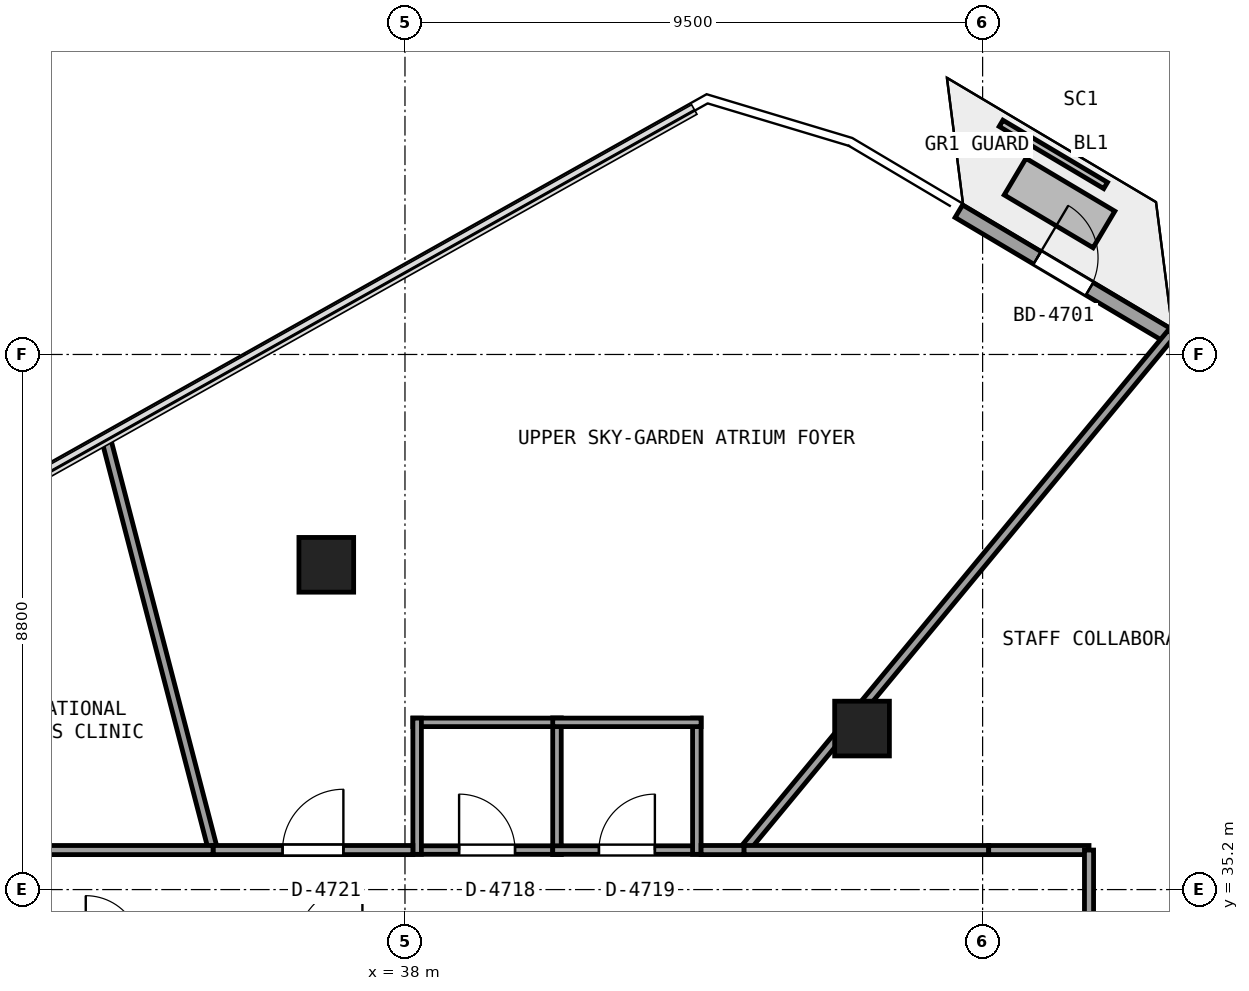
"""IFC4 building model, lengths in metres.
Left out: names, types, materials, properties, quantities, classifications, styles, units other than length and angle.
Written with IfcOpenShell. Run it as: python <this file> out.ifc"""

import sys

from ifc_helpers import new_model, si_unit, direction, frame, frame_2d, origin, origin_2d, place, context, subcontext, project, spatial, rectangle, extrude, element, fill, save


model = new_model("IFC4")
c1 = context("Model", 3, precision=1e-05, world=origin(), true_north=direction((0.0, 1.0)))
c2 = subcontext(c1, "Body", "Model", "MODEL_VIEW")
j1 = project(units=[si_unit("LENGTHUNIT", "METRE"), si_unit("PLANEANGLEUNIT", "RADIAN")], contexts=[c1])
p1 = place(None, origin())
s1 = spatial("IfcSite", under=j1, at=p1, CompositionType="ELEMENT")
p2 = place(p1, origin())
s2 = spatial("IfcBuilding", under=s1, at=p2, CompositionType="ELEMENT")
p3 = place(p2, frame((0.0, 0.0, 177.0)))
s3 = spatial("IfcBuildingStorey", under=s2, at=p3, CompositionType="ELEMENT", Elevation=177.0)
for number, where, z_axis, x_axis in (
    (1, (45.517, 37.848, -0.405), (0.0, 0.0, 1.0), (1.0, 0.0, 0.0)),
    (2, (36.706, 40.541, -0.405), (0.0, 0.0, 1.0), (1.0, 0.0, 0.0)),
):
    element("IfcColumn", number, at=place(p3, frame(where, z_axis=z_axis, x_axis=x_axis)), inside=s3, PredefinedType="COLUMN", context=c2, shape_type="SweptSolid", body=[
        extrude(rectangle(XDim=0.9, YDim=0.9, at=origin_2d()), origin(), (0.0, 0.0, 1.0), 3.725),
    ])
p4 = place(p3, frame((47.109, 46.356, 0.0), z_axis=(0.0, 0.0, 1.0), x_axis=(0.859751743834, -0.510712188003, 0.0)))
e3 = element("IfcWall", 3, at=p4, inside=s3, PredefinedType="SOLIDWALL", context=c2, shape_type="SweptSolid", body=[
    extrude(rectangle(XDim=4.0, YDim=0.24, at=frame_2d((2.0, 0.0))), origin(), (0.0, 0.0, 1.0), 3.32),
])
p5 = place(p4, frame((1.5, 0.0, 0.0)))
e4 = element("IfcOpeningElement", 4, at=p5, cuts=e3, PredefinedType="OPENING", context=c2, shape_type="SweptSolid", body=[
    extrude(rectangle(XDim=1.0, YDim=2.15, at=frame_2d((0.5, 1.075))), frame((0.0, 0.13, 0.0), z_axis=(0.0, -1.0, 0.0), x_axis=(1.0, 0.0, 0.0)), (0.0, 0.0, 1.0), 0.26),
])
p6 = place(p3, frame((38.13, 35.85, 0.0), z_axis=(0.0, 0.0, 1.0), x_axis=(1.0, 0.0, 0.0)))
e5 = element("IfcWall", 5, at=p6, inside=s3, PredefinedType="PARTITIONING", context=c2, shape_type="SweptSolid", body=[
    extrude(rectangle(XDim=2.44, YDim=0.14, at=frame_2d((1.22, 0.0))), origin(), (0.0, 0.0, 1.0), 2.841),
])
p7 = place(p6, frame((0.76, 0.0, 0.0)))
e6 = element("IfcOpeningElement", 6, at=p7, cuts=e5, PredefinedType="OPENING", context=c2, shape_type="SweptSolid", body=[
    extrude(rectangle(XDim=0.92, YDim=2.1, at=frame_2d((0.46, 1.05))), frame((0.0, 0.08, 0.0), z_axis=(0.0, -1.0, 0.0), x_axis=(1.0, 0.0, 0.0)), (0.0, 0.0, 1.0), 0.16),
])
p8 = place(p3, frame((40.5, 35.78, 0.0), z_axis=(0.0, 0.0, 1.0), x_axis=(0.0, 1.0, 0.0)))
e7 = element("IfcWall", 7, at=p8, inside=s3, PredefinedType="PARTITIONING", context=c2, shape_type="SweptSolid", body=[
    extrude(rectangle(XDim=2.24, YDim=0.14, at=frame_2d((1.12, 0.0))), origin(), (0.0, 0.0, 1.0), 2.993),
])
p9 = place(p3, frame((40.57, 37.95, 0.0), z_axis=(0.0, 0.0, 1.0), x_axis=(-1.0, 0.0, 0.0)))
e8 = element("IfcWall", 8, at=p9, inside=s3, PredefinedType="PARTITIONING", context=c2, shape_type="SweptSolid", body=[
    extrude(rectangle(XDim=2.44, YDim=0.14, at=frame_2d((1.22, 0.0))), origin(), (0.0, 0.0, 1.0), 2.841),
])
p10 = place(p3, frame((38.2, 38.02, 0.0), z_axis=(0.0, 0.0, 1.0), x_axis=(0.0, -1.0, 0.0)))
e9 = element("IfcWall", 9, at=p10, inside=s3, PredefinedType="PARTITIONING", context=c2, shape_type="SweptSolid", body=[
    extrude(rectangle(XDim=2.24, YDim=0.14, at=frame_2d((1.12, 0.0))), origin(), (0.0, 0.0, 1.0), 2.993),
])
p11 = place(p3, frame((40.43, 35.85, 0.0), z_axis=(0.0, 0.0, 1.0), x_axis=(1.0, 0.0, 0.0)))
e10 = element("IfcWall", 10, at=p11, inside=s3, PredefinedType="PARTITIONING", context=c2, shape_type="SweptSolid", body=[
    extrude(rectangle(XDim=2.44, YDim=0.14, at=frame_2d((1.22, 0.0))), origin(), (0.0, 0.0, 1.0), 2.841),
])
p12 = place(p11, frame((0.76, 0.0, 0.0)))
e11 = element("IfcOpeningElement", 11, at=p12, cuts=e10, PredefinedType="OPENING", context=c2, shape_type="SweptSolid", body=[
    extrude(rectangle(XDim=0.92, YDim=2.1, at=frame_2d((0.46, 1.05))), frame((0.0, 0.08, 0.0), z_axis=(0.0, -1.0, 0.0), x_axis=(1.0, 0.0, 0.0)), (0.0, 0.0, 1.0), 0.16),
])
p13 = place(p3, frame((42.8, 35.78, 0.0), z_axis=(0.0, 0.0, 1.0), x_axis=(0.0, 1.0, 0.0)))
e12 = element("IfcWall", 12, at=p13, inside=s3, PredefinedType="PARTITIONING", context=c2, shape_type="SweptSolid", body=[
    extrude(rectangle(XDim=2.24, YDim=0.14, at=frame_2d((1.12, 0.0))), origin(), (0.0, 0.0, 1.0), 2.949),
])
p14 = place(p3, frame((42.87, 37.95, 0.0), z_axis=(0.0, 0.0, 1.0), x_axis=(-1.0, 0.0, 0.0)))
e13 = element("IfcWall", 13, at=p14, inside=s3, PredefinedType="PARTITIONING", context=c2, shape_type="SweptSolid", body=[
    extrude(rectangle(XDim=2.44, YDim=0.14, at=frame_2d((1.22, 0.0))), origin(), (0.0, 0.0, 1.0), 2.841),
])
p15 = place(p3, frame((50.607, 44.348, 0.0), z_axis=(0.0, 0.0, 1.0), x_axis=(-0.637583567769, -0.770381200518, 0.0)))
e14 = element("IfcWall", 14, at=p15, inside=s3, PredefinedType="PARTITIONING", context=c2, shape_type="SweptSolid", body=[
    extrude(rectangle(XDim=11.031, YDim=0.15, at=frame_2d((5.515, 0.0))), origin(), (0.0, 0.0, 1.0), 2.949),
])
p16 = place(p3, frame((43.574, 35.85, 0.0), z_axis=(0.0, 0.0, 1.0), x_axis=(1.0, 0.0, 0.0)))
e15 = element("IfcWall", 15, at=p16, inside=s3, PredefinedType="PARTITIONING", context=c2, shape_type="SweptSolid", body=[
    extrude(rectangle(XDim=4.026, YDim=0.15, at=frame_2d((2.013, 0.0))), origin(), (0.0, 0.0, 1.0), 2.697),
])
p17 = place(p3, frame((47.6, 35.85, 0.0), z_axis=(0.0, 0.0, 1.0), x_axis=(1.0, 0.0, 0.0)))
e16 = element("IfcWall", 16, at=p17, inside=s3, PredefinedType="PARTITIONING", context=c2, shape_type="SweptSolid", body=[
    extrude(rectangle(XDim=1.65, YDim=0.15, at=frame_2d((0.825, 0.0))), origin(), (0.0, 0.0, 1.0), 3.32),
])
p18 = place(p3, frame((49.25, 35.85, 0.0), z_axis=(0.0, 0.0, 1.0), x_axis=(0.0, -1.0, 0.0)))
e17 = element("IfcWall", 17, at=p18, inside=s3, PredefinedType="PARTITIONING", context=c2, shape_type="SweptSolid", body=[
    extrude(rectangle(XDim=1.65, YDim=0.15, at=frame_2d((0.825, 0.0))), origin(), (0.0, 0.0, 1.0), 3.32),
])
p19 = place(p3, frame((33.074, 42.648, 0.0), z_axis=(0.0, 0.0, 1.0), x_axis=(0.251977614861, -0.967733063199, 0.0)))
e18 = element("IfcWall", 18, at=p19, inside=s3, PredefinedType="PARTITIONING", context=c2, shape_type="SweptSolid", body=[
    extrude(rectangle(XDim=7.024, YDim=0.15, at=frame_2d((3.512, 0.0))), origin(), (0.0, 0.0, 1.0), 2.905),
])
p20 = place(p3, frame((34.844, 35.85, 0.0), z_axis=(0.0, 0.0, 1.0), x_axis=(1.0, 0.0, 0.0)))
e19 = element("IfcWall", 19, at=p20, inside=s3, PredefinedType="PARTITIONING", context=c2, shape_type="SweptSolid", body=[
    extrude(rectangle(XDim=3.286, YDim=0.15, at=frame_2d((1.643, 0.0))), origin(), (0.0, 0.0, 1.0), 2.697),
])
p21 = place(p20, frame((1.143, 0.0, 0.0)))
e20 = element("IfcOpeningElement", 20, at=p21, cuts=e19, PredefinedType="OPENING", context=c2, shape_type="SweptSolid", body=[
    extrude(rectangle(XDim=1.0, YDim=2.15, at=frame_2d((0.5, 1.075))), frame((0.0, 0.085, 0.0), z_axis=(0.0, -1.0, 0.0), x_axis=(1.0, 0.0, 0.0)), (0.0, 0.0, 1.0), 0.17),
])
p22 = place(p3, frame((42.87, 35.85, 0.0), z_axis=(0.0, 0.0, 1.0), x_axis=(1.0, 0.0, 0.0)))
e21 = element("IfcWall", 21, at=p22, inside=s3, PredefinedType="PARTITIONING", context=c2, shape_type="SweptSolid", body=[
    extrude(rectangle(XDim=0.704, YDim=0.15, at=frame_2d((0.352, 0.0))), origin(), (0.0, 0.0, 1.0), 3.32),
])
p23 = place(p3, frame((26.8, 35.85, 0.0), z_axis=(0.0, 0.0, 1.0), x_axis=(1.0, 0.0, 0.0)))
e22 = element("IfcWall", 22, at=p23, inside=s3, PredefinedType="PARTITIONING", context=c2, shape_type="SweptSolid", body=[
    extrude(rectangle(XDim=8.044, YDim=0.15, at=frame_2d((4.022, 0.0))), origin(), (0.0, 0.0, 1.0), 2.697),
])
p24 = place(p23, frame((3.522, 0.0, 0.0)))
e23 = element("IfcOpeningElement", 23, at=p24, cuts=e22, PredefinedType="OPENING", context=c2, shape_type="SweptSolid", body=[
    extrude(rectangle(XDim=1.0, YDim=2.15, at=frame_2d((0.5, 1.075))), frame((0.0, 0.085, 0.0), z_axis=(0.0, -1.0, 0.0), x_axis=(1.0, 0.0, 0.0)), (0.0, 0.0, 1.0), 0.17),
])
p25 = place(p5, origin())
e24 = element("IfcDoor", 24, at=p25, inside=s3, OperationType="SINGLE_SWING_LEFT", PredefinedType="DOOR", context=c2, shape_type="SweptSolid", body=[
    extrude(rectangle(XDim=1.0, YDim=2.15, at=frame_2d((0.5, 1.075))), frame((0.0, 0.025, 0.0), z_axis=(0.0, -1.0, 0.0), x_axis=(1.0, 0.0, 0.0)), (0.0, 0.0, 1.0), 0.05),
])
fill(e4, e24)
p26 = place(p7, origin())
e25 = element("IfcDoor", 25, at=p26, inside=s3, OperationType="SINGLE_SWING_LEFT", PredefinedType="DOOR", context=c2, shape_type="SweptSolid", body=[
    extrude(rectangle(XDim=0.92, YDim=2.1, at=frame_2d((0.46, 1.05))), frame((0.0, 0.025, 0.0), z_axis=(0.0, -1.0, 0.0), x_axis=(1.0, 0.0, 0.0)), (0.0, 0.0, 1.0), 0.05),
])
fill(e6, e25)
p27 = place(p12, origin())
e26 = element("IfcDoor", 26, at=p27, inside=s3, OperationType="SINGLE_SWING_RIGHT", PredefinedType="DOOR", context=c2, shape_type="SweptSolid", body=[
    extrude(rectangle(XDim=0.92, YDim=2.1, at=frame_2d((0.46, 1.05))), frame((0.0, 0.025, 0.0), z_axis=(0.0, -1.0, 0.0), x_axis=(1.0, 0.0, 0.0)), (0.0, 0.0, 1.0), 0.05),
])
fill(e11, e26)
p28 = place(p21, origin())
e27 = element("IfcDoor", 27, at=p28, inside=s3, OperationType="SINGLE_SWING_RIGHT", PredefinedType="DOOR", context=c2, shape_type="SweptSolid", body=[
    extrude(rectangle(XDim=1.0, YDim=2.15, at=frame_2d((0.5, 1.075))), frame((0.0, 0.025, 0.0), z_axis=(0.0, -1.0, 0.0), x_axis=(1.0, 0.0, 0.0)), (0.0, 0.0, 1.0), 0.05),
])
fill(e20, e27)
save(model, sys.argv[1])
